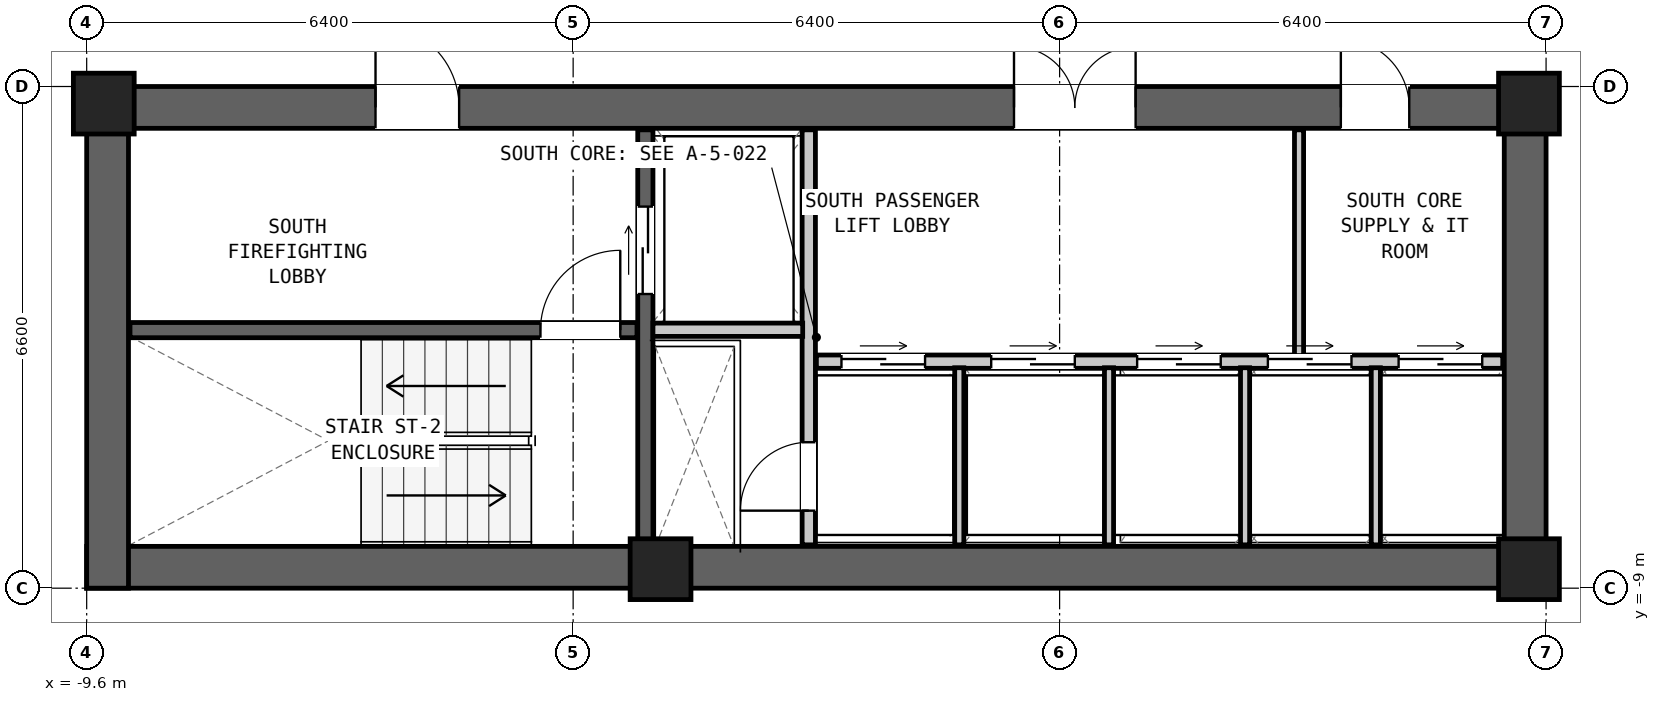
"""IFC4 building model, lengths in metres.
Left out: names, types, materials, properties, quantities, classifications, styles, units other than length and angle.
Written with IfcOpenShell. Run it as: python <this file> out.ifc"""

import sys

from ifc_helpers import new_model, si_unit, direction, frame, frame_2d, origin, origin_2d, place, context, subcontext, project, spatial, rectangle, extrude, element, fill, save


model = new_model("IFC4")
c1 = context("Model", 3, precision=1e-05, world=origin(), true_north=direction((0.0, 1.0)))
c2 = subcontext(c1, "Body", "Model", "MODEL_VIEW")
j1 = project(units=[si_unit("LENGTHUNIT", "METRE"), si_unit("PLANEANGLEUNIT", "RADIAN")], contexts=[c1])
p1 = place(None, origin())
s1 = spatial("IfcSite", under=j1, at=p1, CompositionType="ELEMENT")
p2 = place(p1, origin())
s2 = spatial("IfcBuilding", under=s1, at=p2, CompositionType="ELEMENT")
p3 = place(p2, frame((0.0, 0.0, 69.45)))
s3 = spatial("IfcBuildingStorey", under=s2, at=p3, CompositionType="ELEMENT", Elevation=69.45)
p4 = place(p3, frame((-9.6, -8.725, 0.0), z_axis=(0.0, 0.0, 1.0), x_axis=(1.0, 0.0, 0.0)))
e1 = element("IfcWall", 1, at=p4, inside=s3, PredefinedType="SHEAR", context=c2, shape_type="SweptSolid", body=[
    extrude(rectangle(XDim=19.2, YDim=0.55, at=frame_2d((9.6, 0.0))), origin(), (0.0, 0.0, 1.0), 3.05),
])
p5 = place(p3, frame((-9.6, -2.675, 0.0), z_axis=(0.0, 0.0, 1.0), x_axis=(1.0, 0.0, 0.0)))
e2 = element("IfcWall", 2, at=p5, inside=s3, PredefinedType="SHEAR", context=c2, shape_type="SweptSolid", body=[
    extrude(rectangle(XDim=19.2, YDim=0.55, at=frame_2d((9.6, 0.0))), origin(), (0.0, 0.0, 1.0), 3.05),
])
p6 = place(p5, frame((3.8, 0.0, 0.0)))
e3 = element("IfcOpeningElement", 3, at=p6, cuts=e2, PredefinedType="OPENING", context=c2, shape_type="SweptSolid", body=[
    extrude(rectangle(XDim=1.1, YDim=2.08, at=frame_2d((0.55, 1.04))), frame((0.0, 0.287, 0.0), z_axis=(0.0, -1.0, 0.0), x_axis=(1.0, 0.0, 0.0)), (0.0, 0.0, 1.0), 0.574),
])
p7 = place(p5, frame((12.2, 0.0, 0.0)))
e4 = element("IfcOpeningElement", 4, at=p7, cuts=e2, PredefinedType="OPENING", context=c2, shape_type="SweptSolid", body=[
    extrude(rectangle(XDim=1.6, YDim=2.12, at=frame_2d((0.8, 1.06))), frame((0.0, 0.287, 0.0), z_axis=(0.0, -1.0, 0.0), x_axis=(1.0, 0.0, 0.0)), (0.0, 0.0, 1.0), 0.574),
])
p8 = place(p5, frame((16.5, 0.0, 0.0)))
e5 = element("IfcOpeningElement", 5, at=p8, cuts=e2, PredefinedType="OPENING", context=c2, shape_type="SweptSolid", body=[
    extrude(rectangle(XDim=0.9, YDim=2.05, at=frame_2d((0.45, 1.025))), frame((0.0, 0.287, 0.0), z_axis=(0.0, -1.0, 0.0), x_axis=(1.0, 0.0, 0.0)), (0.0, 0.0, 1.0), 0.574),
])
for number, where, z_axis, x_axis in (
    (6, (-9.325, -9.0, 0.0), (0.0, 0.0, 1.0), (0.0, 1.0, 0.0)),
    (7, (9.325, -9.0, 0.0), (0.0, 0.0, 1.0), (0.0, 1.0, 0.0)),
):
    element("IfcWall", number, at=place(p3, frame(where, z_axis=z_axis, x_axis=x_axis)), inside=s3, PredefinedType="SHEAR", context=c2, shape_type="SweptSolid", body=[
        extrude(rectangle(XDim=6.6, YDim=0.55, at=frame_2d((3.3, 0.0))), origin(), (0.0, 0.0, 1.0), 3.05),
    ])
for number, where, z_axis, x_axis in (
    (8, (-9.375, -2.625, 0.0), (0.0, 0.0, 1.0), (1.0, 0.0, 0.0)),
    (9, (9.375, -2.625, 0.0), (0.0, 0.0, 1.0), (1.0, 0.0, 0.0)),
    (10, (-2.05, -8.75, 0.0), (0.0, 0.0, 1.0), (1.0, 0.0, 0.0)),
    (11, (9.375, -8.75, 0.0), (0.0, 0.0, 1.0), (1.0, 0.0, 0.0)),
):
    element("IfcColumn", number, at=place(p3, frame(where, z_axis=z_axis, x_axis=x_axis)), inside=s3, PredefinedType="COLUMN", context=c2, shape_type="SweptSolid", body=[
        extrude(rectangle(XDim=0.8, YDim=0.8, at=origin_2d()), origin(), (0.0, 0.0, 1.0), 3.05),
    ])
p9 = place(p3, frame((-9.03, -5.605, 0.0), z_axis=(0.0, 0.0, 1.0), x_axis=(1.0, 0.0, 0.0)))
e12 = element("IfcWall", 12, at=p9, inside=s3, PredefinedType="SHEAR", context=c2, shape_type="SweptSolid", body=[
    extrude(rectangle(XDim=6.67, YDim=0.2, at=frame_2d((3.335, 0.0))), origin(), (0.0, 0.0, 1.0), 2.83),
])
p10 = place(p9, frame((5.4, 0.0, 0.0)))
e13 = element("IfcOpeningElement", 13, at=p10, cuts=e12, PredefinedType="OPENING", context=c2, shape_type="SweptSolid", body=[
    extrude(rectangle(XDim=1.05, YDim=2.08, at=frame_2d((0.525, 1.04))), frame((0.0, 0.112, 0.0), z_axis=(0.0, -1.0, 0.0), x_axis=(1.0, 0.0, 0.0)), (0.0, 0.0, 1.0), 0.224),
])
p11 = place(p3, frame((-2.25, -8.43, 0.0), z_axis=(0.0, 0.0, 1.0), x_axis=(0.0, 1.0, 0.0)))
e14 = element("IfcWall", 14, at=p11, inside=s3, PredefinedType="SHEAR", context=c2, shape_type="SweptSolid", body=[
    extrude(rectangle(XDim=5.46, YDim=0.2, at=frame_2d((2.73, 0.0))), origin(), (0.0, 0.0, 1.0), 2.83),
])
p12 = place(p11, frame((3.3, 0.0, 0.0)))
e15 = element("IfcOpeningElement", 15, at=p12, cuts=e14, PredefinedType="OPENING", context=c2, shape_type="SweptSolid", body=[
    extrude(rectangle(XDim=1.15, YDim=2.08, at=frame_2d((0.575, 1.04))), frame((0.0, 0.112, 0.0), z_axis=(0.0, -1.0, 0.0), x_axis=(1.0, 0.0, 0.0)), (0.0, 0.0, 1.0), 0.224),
])
p13 = place(p3, frame((-0.1, -8.43, 0.0), z_axis=(0.0, 0.0, 1.0), x_axis=(0.0, 1.0, 0.0)))
e16 = element("IfcWall", 16, at=p13, inside=s3, PredefinedType="PARTITIONING", context=c2, shape_type="SweptSolid", body=[
    extrude(rectangle(XDim=5.46, YDim=0.175, at=frame_2d((2.73, 0.0))), origin(), (0.0, 0.0, 1.0), 2.83),
])
p14 = place(p13, frame((0.45, 0.0, 0.0)))
e17 = element("IfcOpeningElement", 17, at=p14, cuts=e16, PredefinedType="OPENING", context=c2, shape_type="SweptSolid", body=[
    extrude(rectangle(XDim=0.9, YDim=2.05, at=frame_2d((0.45, 1.025))), frame((0.0, 0.1, 0.0), z_axis=(0.0, -1.0, 0.0), x_axis=(1.0, 0.0, 0.0)), (0.0, 0.0, 1.0), 0.199),
])
p15 = place(p3, frame((-2.15, -5.6, 0.0), z_axis=(0.0, 0.0, 1.0), x_axis=(1.0, 0.0, 0.0)))
e18 = element("IfcWall", 18, at=p15, inside=s3, PredefinedType="PARTITIONING", context=c2, shape_type="SweptSolid", body=[
    extrude(rectangle(XDim=1.97, YDim=0.175, at=frame_2d((0.985, 0.0))), origin(), (0.0, 0.0, 1.0), 2.83),
])
p16 = place(p3, frame((0.0, -6.02, 0.0), z_axis=(0.0, 0.0, 1.0), x_axis=(1.0, 0.0, 0.0)))
e19 = element("IfcWall", 19, at=p16, inside=s3, PredefinedType="PARTITIONING", context=c2, shape_type="SweptSolid", body=[
    extrude(rectangle(XDim=9.03, YDim=0.175, at=frame_2d((4.515, 0.0))), origin(), (0.0, 0.0, 1.0), 2.83),
])
p17 = place(p16, frame((0.33, 0.0, 0.0)))
e20 = element("IfcOpeningElement", 20, at=p17, cuts=e19, PredefinedType="OPENING", context=c2, shape_type="SweptSolid", body=[
    extrude(rectangle(XDim=1.1, YDim=2.06, at=frame_2d((0.55, 1.03))), frame((0.0, 0.1, 0.0), z_axis=(0.0, -1.0, 0.0), x_axis=(1.0, 0.0, 0.0)), (0.0, 0.0, 1.0), 0.199),
])
p18 = place(p16, frame((2.3, 0.0, 0.0)))
e21 = element("IfcOpeningElement", 21, at=p18, cuts=e19, PredefinedType="OPENING", context=c2, shape_type="SweptSolid", body=[
    extrude(rectangle(XDim=1.1, YDim=2.06, at=frame_2d((0.55, 1.03))), frame((0.0, 0.1, 0.0), z_axis=(0.0, -1.0, 0.0), x_axis=(1.0, 0.0, 0.0)), (0.0, 0.0, 1.0), 0.199),
])
p19 = place(p16, frame((4.22, 0.0, 0.0)))
e22 = element("IfcOpeningElement", 22, at=p19, cuts=e19, PredefinedType="OPENING", context=c2, shape_type="SweptSolid", body=[
    extrude(rectangle(XDim=1.1, YDim=2.06, at=frame_2d((0.55, 1.03))), frame((0.0, 0.1, 0.0), z_axis=(0.0, -1.0, 0.0), x_axis=(1.0, 0.0, 0.0)), (0.0, 0.0, 1.0), 0.199),
])
p20 = place(p16, frame((5.94, 0.0, 0.0)))
e23 = element("IfcOpeningElement", 23, at=p20, cuts=e19, PredefinedType="OPENING", context=c2, shape_type="SweptSolid", body=[
    extrude(rectangle(XDim=1.1, YDim=2.06, at=frame_2d((0.55, 1.03))), frame((0.0, 0.1, 0.0), z_axis=(0.0, -1.0, 0.0), x_axis=(1.0, 0.0, 0.0)), (0.0, 0.0, 1.0), 0.199),
])
p21 = place(p16, frame((7.66, 0.0, 0.0)))
e24 = element("IfcOpeningElement", 24, at=p21, cuts=e19, PredefinedType="OPENING", context=c2, shape_type="SweptSolid", body=[
    extrude(rectangle(XDim=1.1, YDim=2.06, at=frame_2d((0.55, 1.03))), frame((0.0, 0.1, 0.0), z_axis=(0.0, -1.0, 0.0), x_axis=(1.0, 0.0, 0.0)), (0.0, 0.0, 1.0), 0.199),
])
for number, where, z_axis, x_axis in (
    (25, (1.88, -8.43, 0.0), (0.0, 0.0, 1.0), (0.0, 1.0, 0.0)),
    (26, (3.85, -8.43, 0.0), (0.0, 0.0, 1.0), (0.0, 1.0, 0.0)),
    (27, (5.64, -8.43, 0.0), (0.0, 0.0, 1.0), (0.0, 1.0, 0.0)),
    (28, (7.36, -8.43, 0.0), (0.0, 0.0, 1.0), (0.0, 1.0, 0.0)),
):
    element("IfcWall", number, at=place(p3, frame(where, z_axis=z_axis, x_axis=x_axis)), inside=s3, PredefinedType="PARTITIONING", context=c2, shape_type="SweptSolid", body=[
        extrude(rectangle(XDim=2.33, YDim=0.12, at=frame_2d((1.165, 0.0))), origin(), (0.0, 0.0, 1.0), 2.83),
    ])
p22 = place(p3, frame((6.35, -5.94, 0.0), z_axis=(0.0, 0.0, 1.0), x_axis=(0.0, 1.0, 0.0)))
e29 = element("IfcWall", 29, at=p22, inside=s3, PredefinedType="PARTITIONING", context=c2, shape_type="SweptSolid", body=[
    extrude(rectangle(XDim=2.97, YDim=0.12, at=frame_2d((1.485, 0.0))), origin(), (0.0, 0.0, 1.0), 2.83),
])
p23 = place(p10, origin())
e30 = element("IfcDoor", 30, at=p23, inside=s3, OperationType="SINGLE_SWING_RIGHT", PredefinedType="DOOR", context=c2, shape_type="SweptSolid", body=[
    extrude(rectangle(XDim=1.05, YDim=2.08, at=frame_2d((0.525, 1.04))), frame((0.0, 0.025, 0.0), z_axis=(0.0, -1.0, 0.0), x_axis=(1.0, 0.0, 0.0)), (0.0, 0.0, 1.0), 0.05),
])
fill(e13, e30)
p24 = place(p6, origin())
e31 = element("IfcDoor", 31, at=p24, inside=s3, OperationType="SINGLE_SWING_LEFT", PredefinedType="DOOR", context=c2, shape_type="SweptSolid", body=[
    extrude(rectangle(XDim=1.1, YDim=2.08, at=frame_2d((0.55, 1.04))), frame((0.0, 0.025, 0.0), z_axis=(0.0, -1.0, 0.0), x_axis=(1.0, 0.0, 0.0)), (0.0, 0.0, 1.0), 0.05),
])
fill(e3, e31)
p25 = place(p12, origin())
e32 = element("IfcDoor", 32, at=p25, inside=s3, OperationType="DOUBLE_DOOR_SLIDING", PredefinedType="DOOR", context=c2, shape_type="SweptSolid", body=[
    extrude(rectangle(XDim=1.15, YDim=2.08, at=frame_2d((0.575, 1.04))), frame((0.0, 0.025, 0.0), z_axis=(0.0, -1.0, 0.0), x_axis=(1.0, 0.0, 0.0)), (0.0, 0.0, 1.0), 0.05),
])
fill(e15, e32)
p26 = place(p14, origin())
e33 = element("IfcDoor", 33, at=p26, inside=s3, OperationType="SINGLE_SWING_LEFT", PredefinedType="DOOR", context=c2, shape_type="SweptSolid", body=[
    extrude(rectangle(XDim=0.9, YDim=2.05, at=frame_2d((0.45, 1.025))), frame((0.0, 0.025, 0.0), z_axis=(0.0, -1.0, 0.0), x_axis=(1.0, 0.0, 0.0)), (0.0, 0.0, 1.0), 0.05),
])
fill(e17, e33)
p27 = place(p7, origin())
e34 = element("IfcDoor", 34, at=p27, inside=s3, OperationType="DOUBLE_DOOR_SINGLE_SWING", PredefinedType="DOOR", context=c2, shape_type="SweptSolid", body=[
    extrude(rectangle(XDim=1.6, YDim=2.12, at=frame_2d((0.8, 1.06))), frame((0.0, 0.025, 0.0), z_axis=(0.0, -1.0, 0.0), x_axis=(1.0, 0.0, 0.0)), (0.0, 0.0, 1.0), 0.05),
])
fill(e4, e34)
p28 = place(p8, origin())
e35 = element("IfcDoor", 35, at=p28, inside=s3, OperationType="SINGLE_SWING_LEFT", PredefinedType="DOOR", context=c2, shape_type="SweptSolid", body=[
    extrude(rectangle(XDim=0.9, YDim=2.05, at=frame_2d((0.45, 1.025))), frame((0.0, 0.025, 0.0), z_axis=(0.0, -1.0, 0.0), x_axis=(1.0, 0.0, 0.0)), (0.0, 0.0, 1.0), 0.05),
])
fill(e5, e35)
p29 = place(p17, origin())
e36 = element("IfcDoor", 36, at=p29, inside=s3, OperationType="DOUBLE_DOOR_SLIDING", PredefinedType="DOOR", context=c2, shape_type="SweptSolid", body=[
    extrude(rectangle(XDim=1.1, YDim=2.06, at=frame_2d((0.55, 1.03))), frame((0.0, 0.025, 0.0), z_axis=(0.0, -1.0, 0.0), x_axis=(1.0, 0.0, 0.0)), (0.0, 0.0, 1.0), 0.05),
])
fill(e20, e36)
p30 = place(p18, origin())
e37 = element("IfcDoor", 37, at=p30, inside=s3, OperationType="DOUBLE_DOOR_SLIDING", PredefinedType="DOOR", context=c2, shape_type="SweptSolid", body=[
    extrude(rectangle(XDim=1.1, YDim=2.06, at=frame_2d((0.55, 1.03))), frame((0.0, 0.025, 0.0), z_axis=(0.0, -1.0, 0.0), x_axis=(1.0, 0.0, 0.0)), (0.0, 0.0, 1.0), 0.05),
])
fill(e21, e37)
p31 = place(p19, origin())
e38 = element("IfcDoor", 38, at=p31, inside=s3, OperationType="DOUBLE_DOOR_SLIDING", PredefinedType="DOOR", context=c2, shape_type="SweptSolid", body=[
    extrude(rectangle(XDim=1.1, YDim=2.06, at=frame_2d((0.55, 1.03))), frame((0.0, 0.025, 0.0), z_axis=(0.0, -1.0, 0.0), x_axis=(1.0, 0.0, 0.0)), (0.0, 0.0, 1.0), 0.05),
])
fill(e22, e38)
p32 = place(p20, origin())
e39 = element("IfcDoor", 39, at=p32, inside=s3, OperationType="DOUBLE_DOOR_SLIDING", PredefinedType="DOOR", context=c2, shape_type="SweptSolid", body=[
    extrude(rectangle(XDim=1.1, YDim=2.06, at=frame_2d((0.55, 1.03))), frame((0.0, 0.025, 0.0), z_axis=(0.0, -1.0, 0.0), x_axis=(1.0, 0.0, 0.0)), (0.0, 0.0, 1.0), 0.05),
])
fill(e23, e39)
p33 = place(p21, origin())
e40 = element("IfcDoor", 40, at=p33, inside=s3, OperationType="DOUBLE_DOOR_SLIDING", PredefinedType="DOOR", context=c2, shape_type="SweptSolid", body=[
    extrude(rectangle(XDim=1.1, YDim=2.06, at=frame_2d((0.55, 1.03))), frame((0.0, 0.025, 0.0), z_axis=(0.0, -1.0, 0.0), x_axis=(1.0, 0.0, 0.0)), (0.0, 0.0, 1.0), 0.05),
])
fill(e24, e40)
save(model, sys.argv[1])
